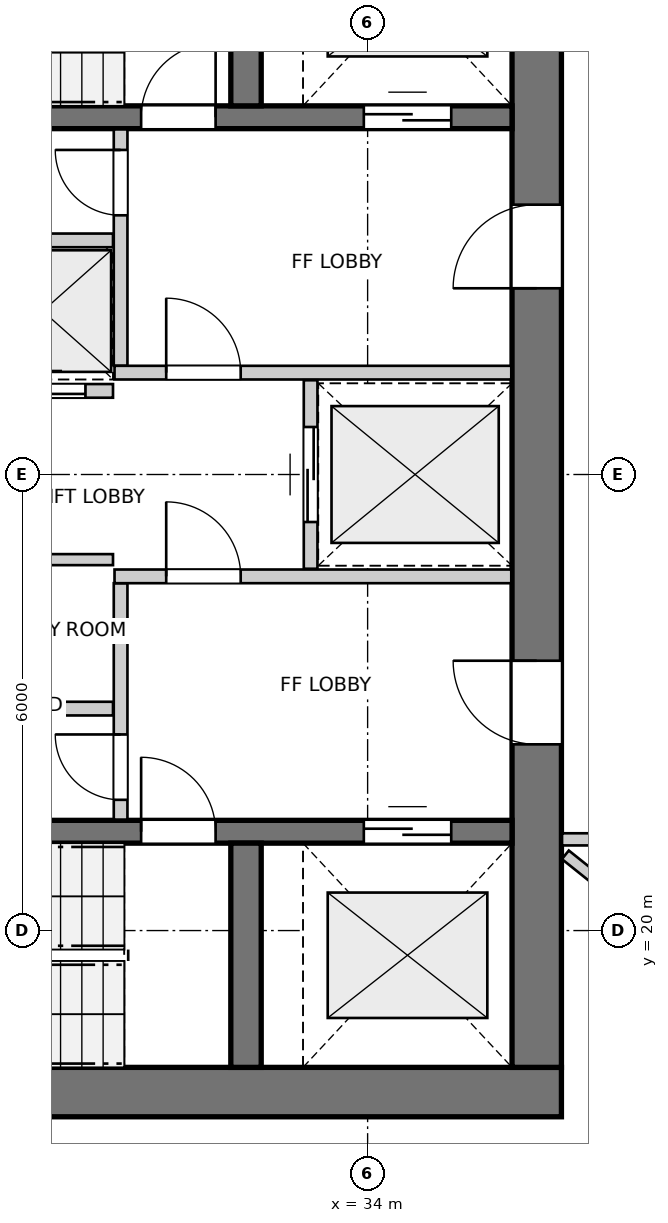
"""IFC4 building model, lengths in metres.
Left out: names, types, materials, properties, quantities, classifications, styles, units other than length and angle.
Written with IfcOpenShell. Run it as: python <this file> out.ifc"""

import sys

from ifc_helpers import new_model, si_unit, direction, frame, frame_2d, origin, place, context, subcontext, project, spatial, rectangle, extrude, source, transform, mapped, element, fill, save


model = new_model("IFC4")
c1 = context("Model", 3, precision=1e-05, world=origin(), true_north=direction((0.0, 1.0)))
c2 = subcontext(c1, "Body", "Model", "MODEL_VIEW")
j1 = project(units=[si_unit("LENGTHUNIT", "METRE"), si_unit("PLANEANGLEUNIT", "RADIAN")], contexts=[c1])
p1 = place(None, origin())
s1 = spatial("IfcSite", under=j1, at=p1, CompositionType="ELEMENT")
p2 = place(p1, origin())
s2 = spatial("IfcBuilding", under=s1, at=p2, CompositionType="ELEMENT")
p3 = place(p2, frame((0.0, 0.0, 133.0)))
s3 = spatial("IfcBuildingStorey", under=s2, at=p3, CompositionType="ELEMENT", Elevation=133.0)
p4 = place(p3, frame((24.15, 17.875, 0.0), z_axis=(0.0, 0.0, 1.0), x_axis=(1.0, 0.0, 0.0)))
e1 = element("IfcWall", 1, at=p4, inside=s3, PredefinedType="SHEAR", context=c2, shape_type="SweptSolid", body=[
    extrude(rectangle(XDim=12.4, YDim=0.65, at=frame_2d((6.2, 0.0))), origin(), (0.0, 0.0, 1.0), 2.95),
])
p5 = place(p3, frame((36.225, 18.2, 0.0), z_axis=(0.0, 0.0, 1.0), x_axis=(0.0, 1.0, 0.0)))
e2 = element("IfcWall", 2, at=p5, inside=s3, PredefinedType="SHEAR", context=c2, shape_type="SweptSolid", body=[
    extrude(rectangle(XDim=15.6, YDim=0.65, at=frame_2d((7.8, 0.0))), origin(), (0.0, 0.0, 1.0), 2.95),
])
p6 = place(p5, frame((4.25, 0.0, 0.0)))
e3 = element("IfcOpeningElement", 3, at=p6, cuts=e2, PredefinedType="OPENING", context=c2, shape_type="SweptSolid", body=[
    extrude(rectangle(XDim=1.1, YDim=2.15, at=frame_2d((0.55, 1.075))), frame((0.0, 0.335, 0.0), z_axis=(0.0, -1.0, 0.0), x_axis=(1.0, 0.0, 0.0)), (0.0, 0.0, 1.0), 0.67),
])
p7 = place(p5, frame((10.25, 0.0, 0.0)))
e4 = element("IfcOpeningElement", 4, at=p7, cuts=e2, PredefinedType="OPENING", context=c2, shape_type="SweptSolid", body=[
    extrude(rectangle(XDim=1.1, YDim=2.15, at=frame_2d((0.55, 1.075))), frame((0.0, 0.335, 0.0), z_axis=(0.0, -1.0, 0.0), x_axis=(1.0, 0.0, 0.0)), (0.0, 0.0, 1.0), 0.67),
])
p8 = place(p3, frame((24.8, 21.3, 0.0), z_axis=(0.0, 0.0, 1.0), x_axis=(1.0, 0.0, 0.0)))
e5 = element("IfcWall", 5, at=p8, inside=s3, PredefinedType="SHEAR", context=c2, shape_type="SweptSolid", body=[
    extrude(rectangle(XDim=11.1, YDim=0.3, at=frame_2d((5.55, 0.0))), origin(), (0.0, 0.0, 1.0), 2.95),
])
p9 = place(p8, frame((6.22, 0.0, 0.0)))
e6 = element("IfcOpeningElement", 6, at=p9, cuts=e5, PredefinedType="OPENING", context=c2, shape_type="SweptSolid", body=[
    extrude(rectangle(XDim=0.98, YDim=2.15, at=frame_2d((0.49, 1.075))), frame((0.0, 0.16, 0.0), z_axis=(0.0, -1.0, 0.0), x_axis=(1.0, 0.0, 0.0)), (0.0, 0.0, 1.0), 0.32),
])
p10 = place(p8, frame((9.15, 0.0, 0.0)))
e7 = element("IfcOpeningElement", 7, at=p10, cuts=e5, PredefinedType="OPENING", context=c2, shape_type="SweptSolid", body=[
    extrude(rectangle(XDim=1.15, YDim=2.15, at=frame_2d((0.575, 1.075))), frame((0.0, 0.16, 0.0), z_axis=(0.0, -1.0, 0.0), x_axis=(1.0, 0.0, 0.0)), (0.0, 0.0, 1.0), 0.32),
])
p11 = place(p3, frame((32.4, 18.2, 0.0), z_axis=(0.0, 0.0, 1.0), x_axis=(0.0, 1.0, 0.0)))
e8 = element("IfcWall", 8, at=p11, inside=s3, PredefinedType="SHEAR", context=c2, shape_type="SweptSolid", body=[
    extrude(rectangle(XDim=2.95, YDim=0.4, at=frame_2d((1.475, 0.0))), origin(), (0.0, 0.0, 1.0), 2.95),
])
p12 = place(p3, frame((24.8, 30.7, 0.0), z_axis=(0.0, 0.0, 1.0), x_axis=(1.0, 0.0, 0.0)))
e9 = element("IfcWall", 9, at=p12, inside=s3, PredefinedType="SHEAR", context=c2, shape_type="SweptSolid", body=[
    extrude(rectangle(XDim=11.1, YDim=0.3, at=frame_2d((5.55, 0.0))), origin(), (0.0, 0.0, 1.0), 2.95),
])
p13 = place(p12, frame((6.22, 0.0, 0.0)))
e10 = element("IfcOpeningElement", 10, at=p13, cuts=e9, PredefinedType="OPENING", context=c2, shape_type="SweptSolid", body=[
    extrude(rectangle(XDim=0.98, YDim=2.15, at=frame_2d((0.49, 1.075))), frame((0.0, 0.16, 0.0), z_axis=(0.0, -1.0, 0.0), x_axis=(1.0, 0.0, 0.0)), (0.0, 0.0, 1.0), 0.32),
])
p14 = place(p12, frame((9.15, 0.0, 0.0)))
e11 = element("IfcOpeningElement", 11, at=p14, cuts=e9, PredefinedType="OPENING", context=c2, shape_type="SweptSolid", body=[
    extrude(rectangle(XDim=1.15, YDim=2.15, at=frame_2d((0.575, 1.075))), frame((0.0, 0.16, 0.0), z_axis=(0.0, -1.0, 0.0), x_axis=(1.0, 0.0, 0.0)), (0.0, 0.0, 1.0), 0.32),
])
p15 = place(p3, frame((32.4, 30.85, 0.0), z_axis=(0.0, 0.0, 1.0), x_axis=(0.0, 1.0, 0.0)))
e12 = element("IfcWall", 12, at=p15, inside=s3, PredefinedType="SHEAR", context=c2, shape_type="SweptSolid", body=[
    extrude(rectangle(XDim=2.95, YDim=0.4, at=frame_2d((1.475, 0.0))), origin(), (0.0, 0.0, 1.0), 2.95),
])
p16 = place(p3, frame((30.75, 21.46, 0.0), z_axis=(0.0, 0.0, 1.0), x_axis=(0.0, 1.0, 0.0)))
e13 = element("IfcWall", 13, at=p16, inside=s3, PredefinedType="PARTITIONING", context=c2, shape_type="SweptSolid", body=[
    extrude(rectangle(XDim=3.11, YDim=0.18, at=frame_2d((1.555, 0.0))), origin(), (0.0, 0.0, 1.0), 2.95),
])
p17 = place(p16, frame((0.26, 0.0, 0.0)))
e14 = element("IfcOpeningElement", 14, at=p17, cuts=e13, PredefinedType="OPENING", context=c2, shape_type="SweptSolid", body=[
    extrude(rectangle(XDim=0.86, YDim=2.05, at=frame_2d((0.43, 1.025))), frame((0.0, 0.1, 0.0), z_axis=(0.0, -1.0, 0.0), x_axis=(1.0, 0.0, 0.0)), (0.0, 0.0, 1.0), 0.2),
])
p18 = place(p3, frame((30.67, 24.66, 0.0), z_axis=(0.0, 0.0, 1.0), x_axis=(1.0, 0.0, 0.0)))
e15 = element("IfcWall", 15, at=p18, inside=s3, PredefinedType="PARTITIONING", context=c2, shape_type="SweptSolid", body=[
    extrude(rectangle(XDim=5.22, YDim=0.18, at=frame_2d((2.61, 0.0))), origin(), (0.0, 0.0, 1.0), 2.95),
])
p19 = place(p18, frame((0.68, 0.0, 0.0)))
e16 = element("IfcOpeningElement", 16, at=p19, cuts=e15, PredefinedType="OPENING", context=c2, shape_type="SweptSolid", body=[
    extrude(rectangle(XDim=0.98, YDim=2.15, at=frame_2d((0.49, 1.075))), frame((0.0, 0.1, 0.0), z_axis=(0.0, -1.0, 0.0), x_axis=(1.0, 0.0, 0.0)), (0.0, 0.0, 1.0), 0.2),
])
p20 = place(p3, frame((30.75, 27.43, 0.0), z_axis=(0.0, 0.0, 1.0), x_axis=(0.0, 1.0, 0.0)))
e17 = element("IfcWall", 17, at=p20, inside=s3, PredefinedType="PARTITIONING", context=c2, shape_type="SweptSolid", body=[
    extrude(rectangle(XDim=3.11, YDim=0.18, at=frame_2d((1.555, 0.0))), origin(), (0.0, 0.0, 1.0), 2.95),
])
p21 = place(p20, frame((1.98, 0.0, 0.0)))
e18 = element("IfcOpeningElement", 18, at=p21, cuts=e17, PredefinedType="OPENING", context=c2, shape_type="SweptSolid", body=[
    extrude(rectangle(XDim=0.86, YDim=2.05, at=frame_2d((0.43, 1.025))), frame((0.0, 0.1, 0.0), z_axis=(0.0, -1.0, 0.0), x_axis=(1.0, 0.0, 0.0)), (0.0, 0.0, 1.0), 0.2),
])
p22 = place(p3, frame((30.67, 27.34, 0.0), z_axis=(0.0, 0.0, 1.0), x_axis=(1.0, 0.0, 0.0)))
e19 = element("IfcWall", 19, at=p22, inside=s3, PredefinedType="PARTITIONING", context=c2, shape_type="SweptSolid", body=[
    extrude(rectangle(XDim=5.22, YDim=0.18, at=frame_2d((2.61, 0.0))), origin(), (0.0, 0.0, 1.0), 2.95),
])
p23 = place(p22, frame((0.68, 0.0, 0.0)))
e20 = element("IfcOpeningElement", 20, at=p23, cuts=e19, PredefinedType="OPENING", context=c2, shape_type="SweptSolid", body=[
    extrude(rectangle(XDim=0.98, YDim=2.15, at=frame_2d((0.49, 1.075))), frame((0.0, 0.1, 0.0), z_axis=(0.0, -1.0, 0.0), x_axis=(1.0, 0.0, 0.0)), (0.0, 0.0, 1.0), 0.2),
])
p24 = place(p3, frame((33.25, 24.76, 0.0), z_axis=(0.0, 0.0, 1.0), x_axis=(0.0, 1.0, 0.0)))
e21 = element("IfcWall", 21, at=p24, inside=s3, PredefinedType="PARTITIONING", context=c2, shape_type="SweptSolid", body=[
    extrude(rectangle(XDim=2.48, YDim=0.18, at=frame_2d((1.24, 0.0))), origin(), (0.0, 0.0, 1.0), 2.95),
])
p25 = place(p24, frame((0.615, 0.0, 0.0)))
e22 = element("IfcOpeningElement", 22, at=p25, cuts=e21, PredefinedType="OPENING", context=c2, shape_type="SweptSolid", body=[
    extrude(rectangle(XDim=1.25, YDim=2.15, at=frame_2d((0.625, 1.075))), frame((0.0, 0.1, 0.0), z_axis=(0.0, -1.0, 0.0), x_axis=(1.0, 0.0, 0.0)), (0.0, 0.0, 1.0), 0.2),
])
p26 = place(p3, frame((24.81, 22.92, 0.0), z_axis=(0.0, 0.0, 1.0), x_axis=(1.0, 0.0, 0.0)))
e23 = element("IfcWall", 23, at=p26, inside=s3, PredefinedType="PARTITIONING", context=c2, shape_type="SweptSolid", body=[
    extrude(rectangle(XDim=5.84, YDim=0.18, at=frame_2d((2.92, 0.0))), origin(), (0.0, 0.0, 1.0), 2.95),
])
p27 = place(p3, frame((24.81, 24.88, 0.0), z_axis=(0.0, 0.0, 1.0), x_axis=(1.0, 0.0, 0.0)))
e24 = element("IfcWall", 24, at=p27, inside=s3, PredefinedType="PARTITIONING", context=c2, shape_type="SweptSolid", body=[
    extrude(rectangle(XDim=5.84, YDim=0.145, at=frame_2d((2.92, 0.0))), origin(), (0.0, 0.0, 1.0), 2.95),
])
p28 = place(p27, frame((2.4, 0.0, 0.0)))
e25 = element("IfcOpeningElement", 25, at=p28, cuts=e24, PredefinedType="OPENING", context=c2, shape_type="SweptSolid", body=[
    extrude(rectangle(XDim=0.96, YDim=2.1, at=frame_2d((0.48, 1.05))), frame((0.0, 0.083, 0.0), z_axis=(0.0, -1.0, 0.0), x_axis=(1.0, 0.0, 0.0)), (0.0, 0.0, 1.0), 0.165),
])
p29 = place(p3, frame((24.81, 29.08, 0.0), z_axis=(0.0, 0.0, 1.0), x_axis=(1.0, 0.0, 0.0)))
e26 = element("IfcWall", 26, at=p29, inside=s3, PredefinedType="PARTITIONING", context=c2, shape_type="SweptSolid", body=[
    extrude(rectangle(XDim=5.84, YDim=0.18, at=frame_2d((2.92, 0.0))), origin(), (0.0, 0.0, 1.0), 2.95),
])
p30 = place(p3, frame((28.825, 27.1, 0.0), z_axis=(0.0, 0.0, 1.0), x_axis=(1.0, 0.0, 0.0)))
e27 = element("IfcWall", 27, at=p30, inside=s3, PredefinedType="PARTITIONING", context=c2, shape_type="SweptSolid", body=[
    extrude(rectangle(XDim=1.825, YDim=0.18, at=frame_2d((0.913, 0.0))), origin(), (0.0, 0.0, 1.0), 2.95),
])
p31 = place(p30, frame((0.363, 0.0, 0.0)))
e28 = element("IfcOpeningElement", 28, at=p31, cuts=e27, PredefinedType="OPENING", context=c2, shape_type="SweptSolid", body=[
    extrude(rectangle(XDim=1.1, YDim=2.15, at=frame_2d((0.55, 1.075))), frame((0.0, 0.1, 0.0), z_axis=(0.0, -1.0, 0.0), x_axis=(1.0, 0.0, 0.0)), (0.0, 0.0, 1.0), 0.2),
])
p32 = place(p3, frame((36.602, 20.997, 0.0), z_axis=(0.0, 0.0, 1.0), x_axis=(0.780696683128, -0.624910144703, 0.0)))
e29 = element("IfcWall", 29, at=p32, inside=s3, PredefinedType="PARTITIONING", context=c2, shape_type="SweptSolid", body=[
    extrude(rectangle(XDim=7.474, YDim=0.145, at=frame_2d((3.737, 0.0))), origin(), (0.0, 0.0, 1.0), 2.95),
])
p33 = place(p3, frame((36.558, 21.2, 0.0), z_axis=(0.0, 0.0, 1.0), x_axis=(1.0, 0.0, 0.0)))
e30 = element("IfcWall", 30, at=p33, inside=s3, PredefinedType="PARTITIONING", context=c2, shape_type="SweptSolid", body=[
    extrude(rectangle(XDim=1.684, YDim=0.16, at=frame_2d((0.842, 0.0))), origin(), (0.0, 0.0, 1.0), 2.95),
])
m1 = source(origin(), c2, "Body", "SweptSolid", [
    extrude(rectangle(XDim=0.98, YDim=2.15, at=frame_2d((0.49, 1.075))), frame((0.0, 0.025, 0.0), z_axis=(0.0, -1.0, 0.0), x_axis=(1.0, 0.0, 0.0)), (0.0, 0.0, 1.0), 0.05),
])
p34 = place(p9, origin())
e31 = element("IfcDoor", 31, at=p34, inside=s3, OperationType="SINGLE_SWING_LEFT", PredefinedType="DOOR", context=c2, shape_type="MappedRepresentation", body=[
    mapped(m1, transform((0.0, 0.0, 0.0), x_axis=(1.0, 0.0, 0.0), y_axis=(0.0, 1.0, 0.0), z_axis=(0.0, 0.0, 1.0), scale=1.0)),
])
fill(e6, e31)
m2 = source(origin(), c2, "Body", "SweptSolid", [
    extrude(rectangle(XDim=1.15, YDim=2.15, at=frame_2d((0.575, 1.075))), frame((0.0, 0.025, 0.0), z_axis=(0.0, -1.0, 0.0), x_axis=(1.0, 0.0, 0.0)), (0.0, 0.0, 1.0), 0.05),
])
p35 = place(p10, origin())
e32 = element("IfcDoor", 32, at=p35, inside=s3, OperationType="DOUBLE_DOOR_SLIDING", PredefinedType="DOOR", context=c2, shape_type="MappedRepresentation", body=[
    mapped(m2, transform((0.0, 0.0, 0.0), x_axis=(1.0, 0.0, 0.0), y_axis=(0.0, 1.0, 0.0), z_axis=(0.0, 0.0, 1.0), scale=1.0)),
])
fill(e7, e32)
p36 = place(p13, origin())
e33 = element("IfcDoor", 33, at=p36, inside=s3, OperationType="SINGLE_SWING_RIGHT", PredefinedType="DOOR", context=c2, shape_type="MappedRepresentation", body=[
    mapped(m1, transform((0.0, 0.0, 0.0), x_axis=(1.0, 0.0, 0.0), y_axis=(0.0, 1.0, 0.0), z_axis=(0.0, 0.0, 1.0), scale=1.0)),
])
fill(e10, e33)
p37 = place(p14, origin())
e34 = element("IfcDoor", 34, at=p37, inside=s3, OperationType="DOUBLE_DOOR_SLIDING", PredefinedType="DOOR", context=c2, shape_type="MappedRepresentation", body=[
    mapped(m2, transform((0.0, 0.0, 0.0), x_axis=(1.0, 0.0, 0.0), y_axis=(0.0, 1.0, 0.0), z_axis=(0.0, 0.0, 1.0), scale=1.0)),
])
fill(e11, e34)
m3 = source(origin(), c2, "Body", "SweptSolid", [
    extrude(rectangle(XDim=1.1, YDim=2.15, at=frame_2d((0.55, 1.075))), frame((0.0, 0.025, 0.0), z_axis=(0.0, -1.0, 0.0), x_axis=(1.0, 0.0, 0.0)), (0.0, 0.0, 1.0), 0.05),
])
p38 = place(p6, origin())
e35 = element("IfcDoor", 35, at=p38, inside=s3, OperationType="SINGLE_SWING_RIGHT", PredefinedType="DOOR", context=c2, shape_type="MappedRepresentation", body=[
    mapped(m3, transform((0.0, 0.0, 0.0), x_axis=(1.0, 0.0, 0.0), y_axis=(0.0, 1.0, 0.0), z_axis=(0.0, 0.0, 1.0), scale=1.0)),
])
fill(e3, e35)
p39 = place(p7, origin())
e36 = element("IfcDoor", 36, at=p39, inside=s3, OperationType="SINGLE_SWING_LEFT", PredefinedType="DOOR", context=c2, shape_type="MappedRepresentation", body=[
    mapped(m3, transform((0.0, 0.0, 0.0), x_axis=(1.0, 0.0, 0.0), y_axis=(0.0, 1.0, 0.0), z_axis=(0.0, 0.0, 1.0), scale=1.0)),
])
fill(e4, e36)
m4 = source(origin(), c2, "Body", "SweptSolid", [
    extrude(rectangle(XDim=0.86, YDim=2.05, at=frame_2d((0.43, 1.025))), frame((0.0, 0.025, 0.0), z_axis=(0.0, -1.0, 0.0), x_axis=(1.0, 0.0, 0.0)), (0.0, 0.0, 1.0), 0.05),
])
p40 = place(p17, origin())
e37 = element("IfcDoor", 37, at=p40, inside=s3, OperationType="SINGLE_SWING_RIGHT", PredefinedType="DOOR", context=c2, shape_type="MappedRepresentation", body=[
    mapped(m4, transform((0.0, 0.0, 0.0), x_axis=(1.0, 0.0, 0.0), y_axis=(0.0, 1.0, 0.0), z_axis=(0.0, 0.0, 1.0), scale=1.0)),
])
fill(e14, e37)
p41 = place(p19, origin())
e38 = element("IfcDoor", 38, at=p41, inside=s3, OperationType="SINGLE_SWING_LEFT", PredefinedType="DOOR", context=c2, shape_type="MappedRepresentation", body=[
    mapped(m1, transform((0.0, 0.0, 0.0), x_axis=(1.0, 0.0, 0.0), y_axis=(0.0, 1.0, 0.0), z_axis=(0.0, 0.0, 1.0), scale=1.0)),
])
fill(e16, e38)
p42 = place(p21, origin())
e39 = element("IfcDoor", 39, at=p42, inside=s3, OperationType="SINGLE_SWING_RIGHT", PredefinedType="DOOR", context=c2, shape_type="MappedRepresentation", body=[
    mapped(m4, transform((0.0, 0.0, 0.0), x_axis=(1.0, 0.0, 0.0), y_axis=(0.0, 1.0, 0.0), z_axis=(0.0, 0.0, 1.0), scale=1.0)),
])
fill(e18, e39)
p43 = place(p23, origin())
e40 = element("IfcDoor", 40, at=p43, inside=s3, OperationType="SINGLE_SWING_LEFT", PredefinedType="DOOR", context=c2, shape_type="MappedRepresentation", body=[
    mapped(m1, transform((0.0, 0.0, 0.0), x_axis=(1.0, 0.0, 0.0), y_axis=(0.0, 1.0, 0.0), z_axis=(0.0, 0.0, 1.0), scale=1.0)),
])
fill(e20, e40)
m5 = source(origin(), c2, "Body", "SweptSolid", [
    extrude(rectangle(XDim=1.25, YDim=2.15, at=frame_2d((0.625, 1.075))), frame((0.0, 0.025, 0.0), z_axis=(0.0, -1.0, 0.0), x_axis=(1.0, 0.0, 0.0)), (0.0, 0.0, 1.0), 0.05),
])
p44 = place(p25, origin())
e41 = element("IfcDoor", 41, at=p44, inside=s3, OperationType="DOUBLE_DOOR_SLIDING", PredefinedType="DOOR", context=c2, shape_type="MappedRepresentation", body=[
    mapped(m5, transform((0.0, 0.0, 0.0), x_axis=(1.0, 0.0, 0.0), y_axis=(0.0, 1.0, 0.0), z_axis=(0.0, 0.0, 1.0), scale=1.0)),
])
fill(e22, e41)
p45 = place(p31, origin())
e42 = element("IfcDoor", 42, at=p45, inside=s3, OperationType="DOUBLE_DOOR_SLIDING", PredefinedType="DOOR", context=c2, shape_type="MappedRepresentation", body=[
    mapped(m3, transform((0.0, 0.0, 0.0), x_axis=(1.0, 0.0, 0.0), y_axis=(0.0, 1.0, 0.0), z_axis=(0.0, 0.0, 1.0), scale=1.0)),
])
fill(e28, e42)
save(model, sys.argv[1])
